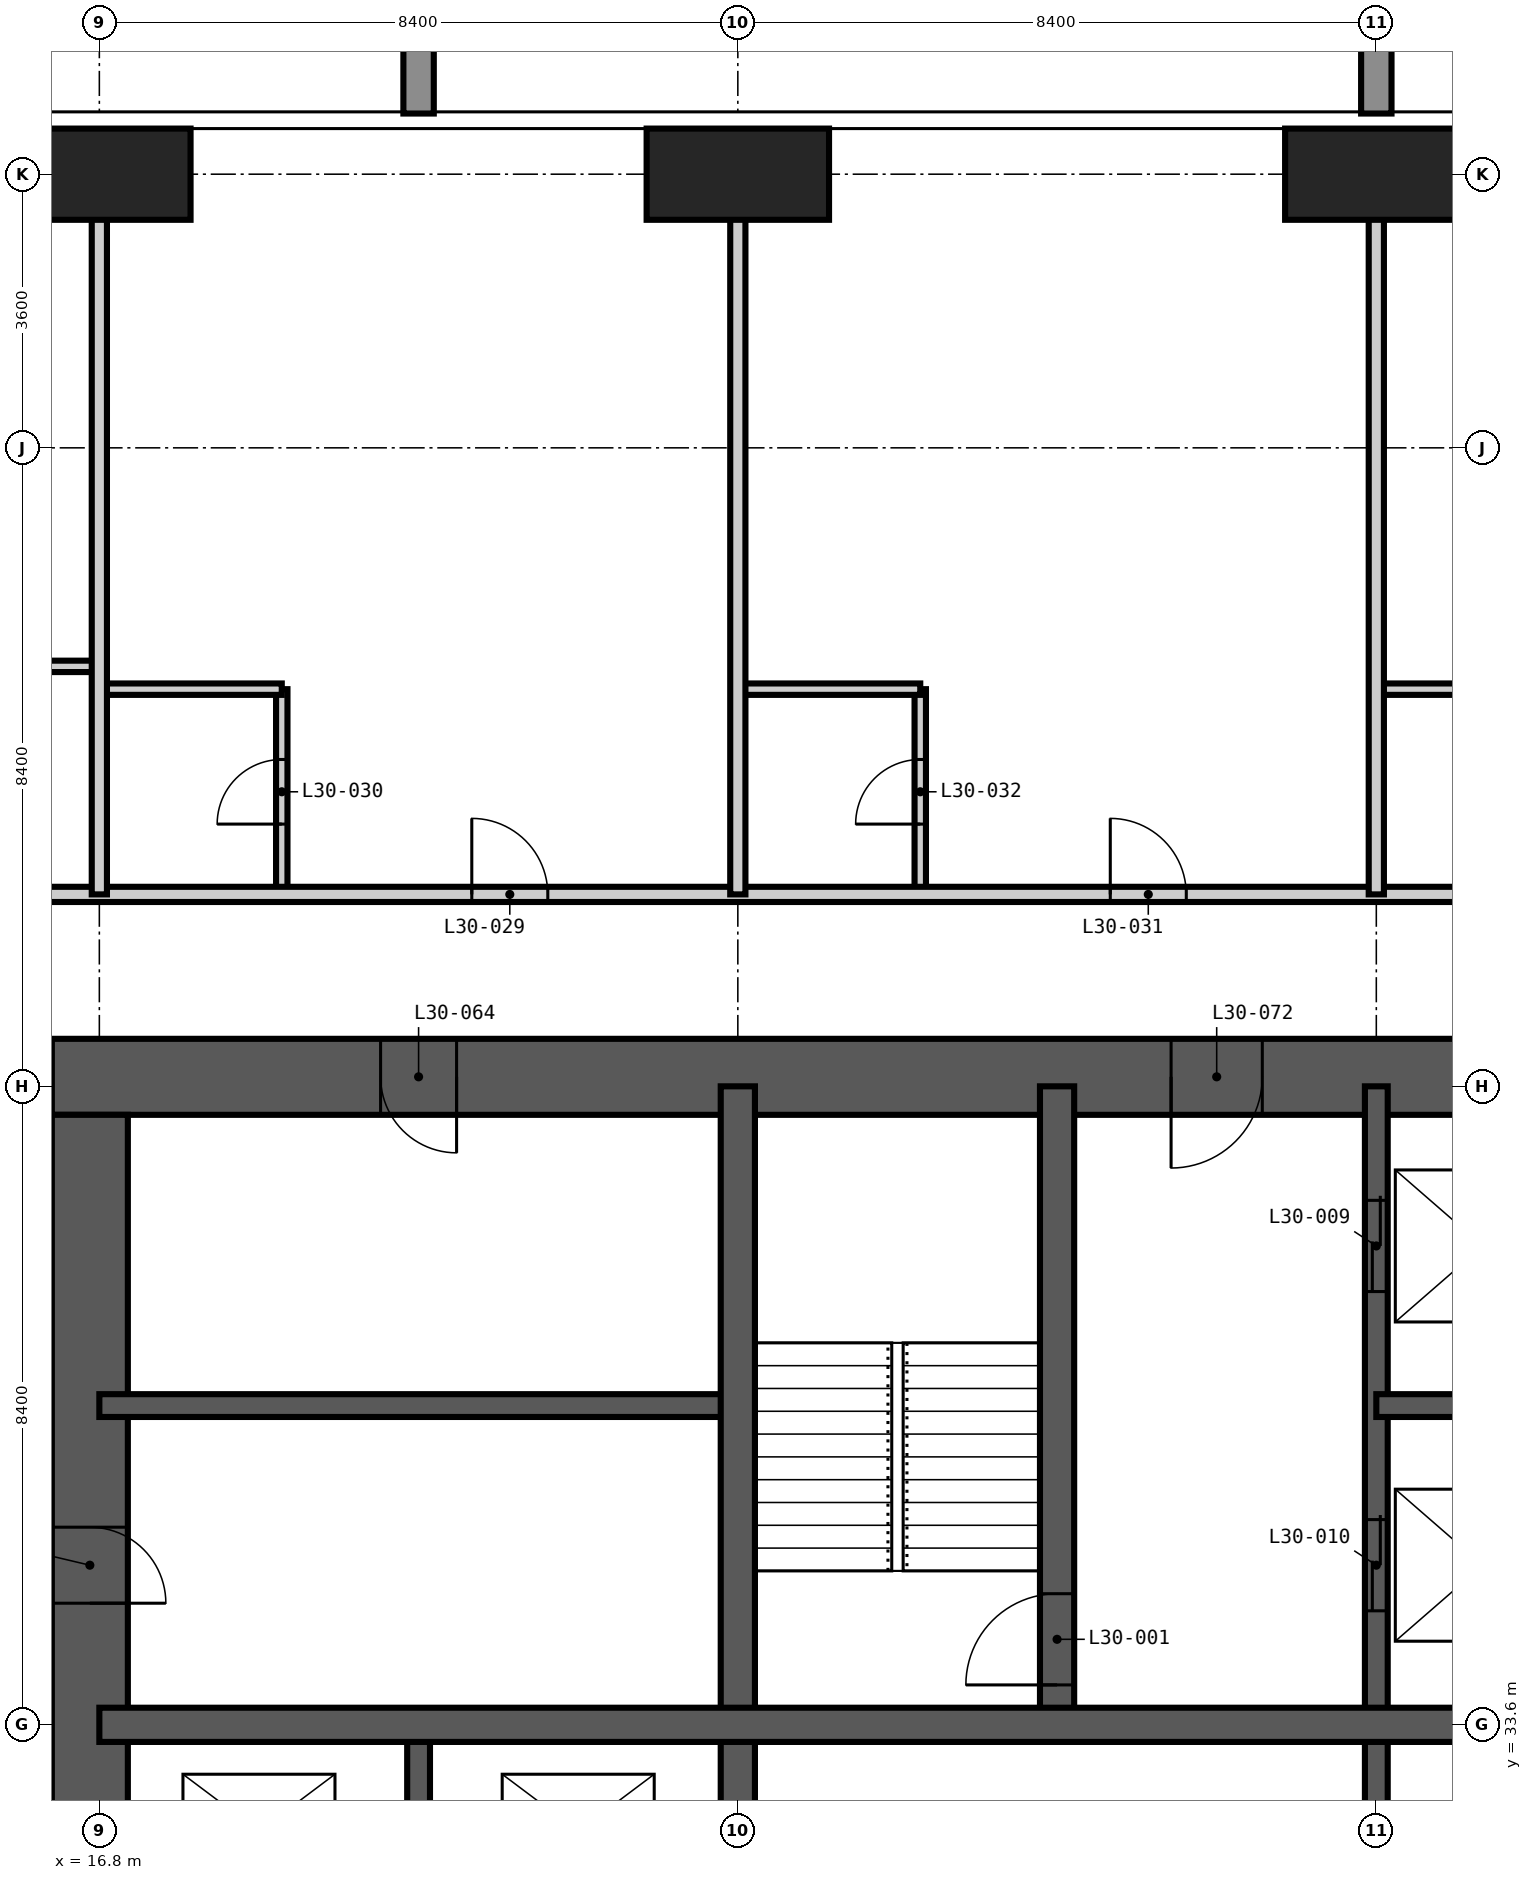
"""IFC4 building model, lengths in metres.
Left out: names, types, materials, properties, quantities, classifications, styles, units other than length and angle.
Written with IfcOpenShell. Run it as: python <this file> out.ifc"""

import sys

from ifc_helpers import new_model, si_unit, direction, frame, frame_2d, origin, origin_2d, place, context, subcontext, project, spatial, rectangle, extrude, element, fill, save


model = new_model("IFC4")
c1 = context("Model", 3, precision=1e-05, world=origin(), true_north=direction((0.0, 1.0)))
c2 = subcontext(c1, "Body", "Model", "MODEL_VIEW")
j1 = project(units=[si_unit("LENGTHUNIT", "METRE"), si_unit("PLANEANGLEUNIT", "RADIAN")], contexts=[c1])
p1 = place(None, origin())
s1 = spatial("IfcSite", under=j1, at=p1, CompositionType="ELEMENT")
p2 = place(p1, origin())
s2 = spatial("IfcBuilding", under=s1, at=p2, CompositionType="ELEMENT")
p3 = place(p2, frame((0.0, 0.0, 118.8)))
s3 = spatial("IfcBuildingStorey", under=s2, at=p3, CompositionType="ELEMENT", Elevation=118.8)
for number, where, z_axis, x_axis in (
    (1, (16.8, 54.0, -0.35), (0.0, 0.0, 1.0), (1.0, 0.0, 0.0)),
    (2, (25.2, 54.0, -0.35), (0.0, 0.0, 1.0), (1.0, 0.0, 0.0)),
    (3, (33.6, 54.0, -0.35), (0.0, 0.0, 1.0), (1.0, 0.0, 0.0)),
):
    element("IfcColumn", number, at=place(p3, frame(where, z_axis=z_axis, x_axis=x_axis)), inside=s3, PredefinedType="COLUMN", context=c2, shape_type="SweptSolid", body=[
        extrude(rectangle(XDim=2.4, YDim=1.2, at=origin_2d()), origin(), (0.0, 0.0, 1.0), 3.6),
    ])
p4 = place(p3, frame((42.625, 42.125, -0.35), z_axis=(0.0, 0.0, 1.0), x_axis=(-1.0, 0.0, 0.0)))
e4 = element("IfcWall", 4, at=p4, inside=s3, PredefinedType="SHEAR", context=c2, shape_type="SweptSolid", body=[
    extrude(rectangle(XDim=26.45, YDim=1.0, at=frame_2d((13.225, 0.0))), origin(), (0.0, 0.0, 1.0), 3.6),
])
p5 = place(p4, frame((21.125, 0.0, 0.35)))
e5 = element("IfcOpeningElement", 5, at=p5, cuts=e4, PredefinedType="OPENING", context=c2, shape_type="SweptSolid", body=[
    extrude(rectangle(XDim=1.0, YDim=2.1, at=frame_2d((0.5, 1.05))), frame((0.0, 0.51, 0.0), z_axis=(0.0, -1.0, 0.0), x_axis=(1.0, 0.0, 0.0)), (0.0, 0.0, 1.0), 1.02),
])
p6 = place(p4, frame((10.525, 0.0, 0.35)))
e6 = element("IfcOpeningElement", 6, at=p6, cuts=e4, PredefinedType="OPENING", context=c2, shape_type="SweptSolid", body=[
    extrude(rectangle(XDim=1.2, YDim=2.2, at=frame_2d((0.6, 1.1))), frame((0.0, 0.51, 0.0), z_axis=(0.0, -1.0, 0.0), x_axis=(1.0, 0.0, 0.0)), (0.0, 0.0, 1.0), 1.02),
])
p7 = place(p3, frame((16.675, 41.625, -0.35), z_axis=(0.0, 0.0, 1.0), x_axis=(0.0, -1.0, 0.0)))
e7 = element("IfcWall", 7, at=p7, inside=s3, PredefinedType="SHEAR", context=c2, shape_type="SweptSolid", body=[
    extrude(rectangle(XDim=24.45, YDim=1.0, at=frame_2d((12.225, 0.0))), origin(), (0.0, 0.0, 1.0), 3.6),
])
p8 = place(p7, frame((11.325, 0.0, 0.35)))
e8 = element("IfcOpeningElement", 8, at=p8, cuts=e7, PredefinedType="OPENING", context=c2, shape_type="SweptSolid", body=[
    extrude(rectangle(XDim=1.8, YDim=2.2, at=frame_2d((0.9, 1.1))), frame((0.0, 0.51, 0.0), z_axis=(0.0, -1.0, 0.0), x_axis=(1.0, 0.0, 0.0)), (0.0, 0.0, 1.0), 1.02),
])
p9 = place(p7, frame((20.125, 0.0, 0.35)))
e9 = element("IfcOpeningElement", 9, at=p9, cuts=e7, PredefinedType="OPENING", context=c2, shape_type="SweptSolid", body=[
    extrude(rectangle(XDim=1.0, YDim=2.1, at=frame_2d((0.5, 1.05))), frame((0.0, 0.51, 0.0), z_axis=(0.0, -1.0, 0.0), x_axis=(1.0, 0.0, 0.0)), (0.0, 0.0, 1.0), 1.02),
])
p10 = place(p7, frame((5.425, 0.0, 0.35)))
e10 = element("IfcOpeningElement", 10, at=p10, cuts=e7, PredefinedType="OPENING", context=c2, shape_type="SweptSolid", body=[
    extrude(rectangle(XDim=1.0, YDim=2.1, at=frame_2d((0.5, 1.05))), frame((0.0, 0.51, 0.0), z_axis=(0.0, -1.0, 0.0), x_axis=(1.0, 0.0, 0.0)), (0.0, 0.0, 1.0), 1.02),
])
p11 = place(p3, frame((21.0, 30.8, -0.35), z_axis=(0.0, 0.0, 1.0), x_axis=(0.0, 1.0, 0.0)))
e11 = element("IfcWall", 11, at=p11, inside=s3, PredefinedType="SHEAR", context=c2, shape_type="SweptSolid", body=[
    extrude(rectangle(XDim=2.8, YDim=0.3, at=frame_2d((1.4, 0.0))), origin(), (0.0, 0.0, 1.0), 3.6),
])
p12 = place(p3, frame((33.6, 16.8, -0.35), z_axis=(0.0, 0.0, 1.0), x_axis=(0.0, 1.0, 0.0)))
e12 = element("IfcWall", 12, at=p12, inside=s3, PredefinedType="SHEAR", context=c2, shape_type="SweptSolid", body=[
    extrude(rectangle(XDim=25.2, YDim=0.3, at=frame_2d((12.6, 0.0))), origin(), (0.0, 0.0, 1.0), 3.6),
])
p13 = place(p12, frame((22.5, 0.0, 0.35)))
e13 = element("IfcOpeningElement", 13, at=p13, cuts=e12, PredefinedType="OPENING", context=c2, shape_type="SweptSolid", body=[
    extrude(rectangle(XDim=1.2, YDim=2.2, at=frame_2d((0.6, 1.1))), frame((0.0, 0.16, 0.0), z_axis=(0.0, -1.0, 0.0), x_axis=(1.0, 0.0, 0.0)), (0.0, 0.0, 1.0), 0.32),
])
p14 = place(p12, frame((18.3, 0.0, 0.35)))
e14 = element("IfcOpeningElement", 14, at=p14, cuts=e12, PredefinedType="OPENING", context=c2, shape_type="SweptSolid", body=[
    extrude(rectangle(XDim=1.2, YDim=2.2, at=frame_2d((0.6, 1.1))), frame((0.0, 0.16, 0.0), z_axis=(0.0, -1.0, 0.0), x_axis=(1.0, 0.0, 0.0)), (0.0, 0.0, 1.0), 0.32),
])
p15 = place(p3, frame((16.8, 37.8, -0.35), z_axis=(0.0, 0.0, 1.0), x_axis=(1.0, 0.0, 0.0)))
e15 = element("IfcWall", 15, at=p15, inside=s3, PredefinedType="SHEAR", context=c2, shape_type="SweptSolid", body=[
    extrude(rectangle(XDim=8.4, YDim=0.3, at=frame_2d((4.2, 0.0))), origin(), (0.0, 0.0, 1.0), 3.6),
])
p16 = place(p3, frame((33.6, 37.8, -0.35), z_axis=(0.0, 0.0, 1.0), x_axis=(1.0, 0.0, 0.0)))
e16 = element("IfcWall", 16, at=p16, inside=s3, PredefinedType="SHEAR", context=c2, shape_type="SweptSolid", body=[
    extrude(rectangle(XDim=2.8, YDim=0.3, at=frame_2d((1.4, 0.0))), origin(), (0.0, 0.0, 1.0), 3.6),
])
p17 = place(p3, frame((25.2, 16.8, -0.35), z_axis=(0.0, 0.0, 1.0), x_axis=(0.0, 1.0, 0.0)))
e17 = element("IfcWall", 17, at=p17, inside=s3, PredefinedType="SHEAR", context=c2, shape_type="SweptSolid", body=[
    extrude(rectangle(XDim=25.2, YDim=0.45, at=frame_2d((12.6, 0.0))), origin(), (0.0, 0.0, 1.0), 3.6),
])
p18 = place(p17, frame((12.1, 0.0, 0.35)))
e18 = element("IfcOpeningElement", 18, at=p18, cuts=e17, PredefinedType="OPENING", context=c2, shape_type="SweptSolid", body=[
    extrude(rectangle(XDim=1.0, YDim=2.1, at=frame_2d((0.5, 1.05))), frame((0.0, 0.235, 0.0), z_axis=(0.0, -1.0, 0.0), x_axis=(1.0, 0.0, 0.0)), (0.0, 0.0, 1.0), 0.47),
])
p19 = place(p3, frame((29.4, 33.6, -0.35), z_axis=(0.0, 0.0, 1.0), x_axis=(0.0, 1.0, 0.0)))
e19 = element("IfcWall", 19, at=p19, inside=s3, PredefinedType="SHEAR", context=c2, shape_type="SweptSolid", body=[
    extrude(rectangle(XDim=8.4, YDim=0.45, at=frame_2d((4.2, 0.0))), origin(), (0.0, 0.0, 1.0), 3.6),
])
p20 = place(p19, frame((0.525, 0.0, 0.35)))
e20 = element("IfcOpeningElement", 20, at=p20, cuts=e19, PredefinedType="OPENING", context=c2, shape_type="SweptSolid", body=[
    extrude(rectangle(XDim=1.2, YDim=2.2, at=frame_2d((0.6, 1.1))), frame((0.0, 0.235, 0.0), z_axis=(0.0, -1.0, 0.0), x_axis=(1.0, 0.0, 0.0)), (0.0, 0.0, 1.0), 0.47),
])
p21 = place(p3, frame((16.8, 33.6, -0.35), z_axis=(0.0, 0.0, 1.0), x_axis=(1.0, 0.0, 0.0)))
e21 = element("IfcWall", 21, at=p21, inside=s3, PredefinedType="SHEAR", context=c2, shape_type="SweptSolid", body=[
    extrude(rectangle(XDim=25.2, YDim=0.45, at=frame_2d((12.6, 0.0))), origin(), (0.0, 0.0, 1.0), 3.6),
])
p22 = place(p21, frame((22.6, 0.0, 0.35)))
e22 = element("IfcOpeningElement", 22, at=p22, cuts=e21, PredefinedType="OPENING", context=c2, shape_type="SweptSolid", body=[
    extrude(rectangle(XDim=1.0, YDim=2.1, at=frame_2d((0.5, 1.05))), frame((0.0, 0.235, 0.0), z_axis=(0.0, -1.0, 0.0), x_axis=(1.0, 0.0, 0.0)), (0.0, 0.0, 1.0), 0.47),
])
p23 = place(p3, frame((19.2, 44.525, 0.0), z_axis=(0.0, 0.0, 1.0), x_axis=(0.0, 1.0, 0.0)))
e23 = element("IfcWall", 23, at=p23, inside=s3, PredefinedType="PARTITIONING", context=c2, shape_type="SweptSolid", body=[
    extrude(rectangle(XDim=2.7, YDim=0.15, at=frame_2d((1.35, 0.0))), origin(), (0.0, 0.0, 1.0), 3.25),
])
p24 = place(p23, frame((0.925, 0.0, 0.0)))
e24 = element("IfcOpeningElement", 24, at=p24, cuts=e23, PredefinedType="OPENING", context=c2, shape_type="SweptSolid", body=[
    extrude(rectangle(XDim=0.85, YDim=2.1, at=frame_2d((0.425, 1.05))), frame((0.0, 0.085, 0.0), z_axis=(0.0, -1.0, 0.0), x_axis=(1.0, 0.0, 0.0)), (0.0, 0.0, 1.0), 0.17),
])
p25 = place(p3, frame((27.6, 44.525, 0.0), z_axis=(0.0, 0.0, 1.0), x_axis=(0.0, 1.0, 0.0)))
e25 = element("IfcWall", 25, at=p25, inside=s3, PredefinedType="PARTITIONING", context=c2, shape_type="SweptSolid", body=[
    extrude(rectangle(XDim=2.7, YDim=0.15, at=frame_2d((1.35, 0.0))), origin(), (0.0, 0.0, 1.0), 3.25),
])
p26 = place(p25, frame((0.925, 0.0, 0.0)))
e26 = element("IfcOpeningElement", 26, at=p26, cuts=e25, PredefinedType="OPENING", context=c2, shape_type="SweptSolid", body=[
    extrude(rectangle(XDim=0.85, YDim=2.1, at=frame_2d((0.425, 1.05))), frame((0.0, 0.085, 0.0), z_axis=(0.0, -1.0, 0.0), x_axis=(1.0, 0.0, 0.0)), (0.0, 0.0, 1.0), 0.17),
])
p27 = place(p3, frame((16.8, 47.225, 0.0), z_axis=(0.0, 0.0, 1.0), x_axis=(1.0, 0.0, 0.0)))
e27 = element("IfcWall", 27, at=p27, inside=s3, PredefinedType="PARTITIONING", context=c2, shape_type="SweptSolid", body=[
    extrude(rectangle(XDim=2.4, YDim=0.15, at=frame_2d((1.2, 0.0))), origin(), (0.0, 0.0, 1.0), 3.25),
])
p28 = place(p3, frame((25.2, 47.225, 0.0), z_axis=(0.0, 0.0, 1.0), x_axis=(1.0, 0.0, 0.0)))
e28 = element("IfcWall", 28, at=p28, inside=s3, PredefinedType="PARTITIONING", context=c2, shape_type="SweptSolid", body=[
    extrude(rectangle(XDim=2.4, YDim=0.15, at=frame_2d((1.2, 0.0))), origin(), (0.0, 0.0, 1.0), 3.25),
])
p29 = place(p3, frame((33.6, 47.225, 0.0), z_axis=(0.0, 0.0, 1.0), x_axis=(1.0, 0.0, 0.0)))
e29 = element("IfcWall", 29, at=p29, inside=s3, PredefinedType="PARTITIONING", context=c2, shape_type="SweptSolid", body=[
    extrude(rectangle(XDim=2.4, YDim=0.15, at=frame_2d((1.2, 0.0))), origin(), (0.0, 0.0, 1.0), 3.25),
])
p30 = place(p3, frame((12.6, 47.525, 0.0), z_axis=(0.0, 0.0, 1.0), x_axis=(1.0, 0.0, 0.0)))
e30 = element("IfcWall", 30, at=p30, inside=s3, PredefinedType="PARTITIONING", context=c2, shape_type="SweptSolid", body=[
    extrude(rectangle(XDim=4.2, YDim=0.15, at=frame_2d((2.1, 0.0))), origin(), (0.0, 0.0, 1.0), 3.25),
])
p31 = place(p30, frame((1.675, 0.0, 0.0)))
e31 = element("IfcOpeningElement", 31, at=p31, cuts=e30, PredefinedType="OPENING", context=c2, shape_type="SweptSolid", body=[
    extrude(rectangle(XDim=0.85, YDim=2.1, at=frame_2d((0.425, 1.05))), frame((0.0, 0.085, 0.0), z_axis=(0.0, -1.0, 0.0), x_axis=(1.0, 0.0, 0.0)), (0.0, 0.0, 1.0), 0.17),
])
p32 = place(p3, frame((12.6, 44.525, 0.0), z_axis=(0.0, 0.0, 1.0), x_axis=(1.0, 0.0, 0.0)))
e32 = element("IfcWall", 32, at=p32, inside=s3, PredefinedType="PARTITIONING", context=c2, shape_type="SweptSolid", body=[
    extrude(rectangle(XDim=32.525, YDim=0.2, at=frame_2d((16.262, 0.0))), origin(), (0.0, 0.0, 1.0), 3.25),
])
p33 = place(p32, frame((9.1, 0.0, 0.0)))
e33 = element("IfcOpeningElement", 33, at=p33, cuts=e32, PredefinedType="OPENING", context=c2, shape_type="SweptSolid", body=[
    extrude(rectangle(XDim=1.0, YDim=2.2, at=frame_2d((0.5, 1.1))), frame((0.0, 0.11, 0.0), z_axis=(0.0, -1.0, 0.0), x_axis=(1.0, 0.0, 0.0)), (0.0, 0.0, 1.0), 0.22),
])
p34 = place(p32, frame((17.5, 0.0, 0.0)))
e34 = element("IfcOpeningElement", 34, at=p34, cuts=e32, PredefinedType="OPENING", context=c2, shape_type="SweptSolid", body=[
    extrude(rectangle(XDim=1.0, YDim=2.2, at=frame_2d((0.5, 1.1))), frame((0.0, 0.11, 0.0), z_axis=(0.0, -1.0, 0.0), x_axis=(1.0, 0.0, 0.0)), (0.0, 0.0, 1.0), 0.22),
])
p35 = place(p32, frame((25.9, 0.0, 0.0)))
e35 = element("IfcOpeningElement", 35, at=p35, cuts=e32, PredefinedType="OPENING", context=c2, shape_type="SweptSolid", body=[
    extrude(rectangle(XDim=1.0, YDim=2.2, at=frame_2d((0.5, 1.1))), frame((0.0, 0.11, 0.0), z_axis=(0.0, -1.0, 0.0), x_axis=(1.0, 0.0, 0.0)), (0.0, 0.0, 1.0), 0.22),
])
for number, where, z_axis, x_axis in (
    (36, (16.8, 44.525, 0.0), (0.0, 0.0, 1.0), (0.0, 1.0, 0.0)),
    (37, (25.2, 44.525, 0.0), (0.0, 0.0, 1.0), (0.0, 1.0, 0.0)),
    (38, (33.6, 44.525, 0.0), (0.0, 0.0, 1.0), (0.0, 1.0, 0.0)),
):
    element("IfcWall", number, at=place(p3, frame(where, z_axis=z_axis, x_axis=x_axis)), inside=s3, PredefinedType="PARTITIONING", context=c2, shape_type="SweptSolid", body=[
        extrude(rectangle(XDim=10.093, YDim=0.2, at=frame_2d((5.046, 0.0))), origin(), (0.0, 0.0, 1.0), 3.25),
    ])
p36 = place(p20, origin())
e39 = element("IfcDoor", 39, at=p36, inside=s3, OperationType="SINGLE_SWING_LEFT", PredefinedType="DOOR", context=c2, shape_type="SweptSolid", body=[
    extrude(rectangle(XDim=1.2, YDim=2.2, at=frame_2d((0.6, 1.1))), frame((0.0, 0.025, 0.0), z_axis=(0.0, -1.0, 0.0), x_axis=(1.0, 0.0, 0.0)), (0.0, 0.0, 1.0), 0.05),
])
fill(e20, e39)
p37 = place(p13, origin())
e40 = element("IfcDoor", 40, at=p37, inside=s3, OperationType="DOUBLE_DOOR_SLIDING", PredefinedType="DOOR", context=c2, shape_type="SweptSolid", body=[
    extrude(rectangle(XDim=1.2, YDim=2.2, at=frame_2d((0.6, 1.1))), frame((0.0, 0.025, 0.0), z_axis=(0.0, -1.0, 0.0), x_axis=(1.0, 0.0, 0.0)), (0.0, 0.0, 1.0), 0.05),
])
fill(e13, e40)
p38 = place(p14, origin())
e41 = element("IfcDoor", 41, at=p38, inside=s3, OperationType="DOUBLE_DOOR_SLIDING", PredefinedType="DOOR", context=c2, shape_type="SweptSolid", body=[
    extrude(rectangle(XDim=1.2, YDim=2.2, at=frame_2d((0.6, 1.1))), frame((0.0, 0.025, 0.0), z_axis=(0.0, -1.0, 0.0), x_axis=(1.0, 0.0, 0.0)), (0.0, 0.0, 1.0), 0.05),
])
fill(e14, e41)
p39 = place(p33, origin())
e42 = element("IfcDoor", 42, at=p39, inside=s3, OperationType="SINGLE_SWING_LEFT", PredefinedType="DOOR", context=c2, shape_type="SweptSolid", body=[
    extrude(rectangle(XDim=1.0, YDim=2.2, at=frame_2d((0.5, 1.1))), frame((0.0, 0.025, 0.0), z_axis=(0.0, -1.0, 0.0), x_axis=(1.0, 0.0, 0.0)), (0.0, 0.0, 1.0), 0.05),
])
fill(e33, e42)
p40 = place(p24, origin())
e43 = element("IfcDoor", 43, at=p40, inside=s3, OperationType="SINGLE_SWING_LEFT", PredefinedType="DOOR", context=c2, shape_type="SweptSolid", body=[
    extrude(rectangle(XDim=0.85, YDim=2.1, at=frame_2d((0.425, 1.05))), frame((0.0, 0.025, 0.0), z_axis=(0.0, -1.0, 0.0), x_axis=(1.0, 0.0, 0.0)), (0.0, 0.0, 1.0), 0.05),
])
fill(e24, e43)
p41 = place(p34, origin())
e44 = element("IfcDoor", 44, at=p41, inside=s3, OperationType="SINGLE_SWING_LEFT", PredefinedType="DOOR", context=c2, shape_type="SweptSolid", body=[
    extrude(rectangle(XDim=1.0, YDim=2.2, at=frame_2d((0.5, 1.1))), frame((0.0, 0.025, 0.0), z_axis=(0.0, -1.0, 0.0), x_axis=(1.0, 0.0, 0.0)), (0.0, 0.0, 1.0), 0.05),
])
fill(e34, e44)
p42 = place(p26, origin())
e45 = element("IfcDoor", 45, at=p42, inside=s3, OperationType="SINGLE_SWING_LEFT", PredefinedType="DOOR", context=c2, shape_type="SweptSolid", body=[
    extrude(rectangle(XDim=0.85, YDim=2.1, at=frame_2d((0.425, 1.05))), frame((0.0, 0.025, 0.0), z_axis=(0.0, -1.0, 0.0), x_axis=(1.0, 0.0, 0.0)), (0.0, 0.0, 1.0), 0.05),
])
fill(e26, e45)
p43 = place(p10, origin())
e46 = element("IfcDoor", 46, at=p43, inside=s3, OperationType="SINGLE_SWING_RIGHT", PredefinedType="DOOR", context=c2, shape_type="SweptSolid", body=[
    extrude(rectangle(XDim=1.0, YDim=2.1, at=frame_2d((0.5, 1.05))), frame((0.0, 0.025, 0.0), z_axis=(0.0, -1.0, 0.0), x_axis=(1.0, 0.0, 0.0)), (0.0, 0.0, 1.0), 0.05),
])
fill(e10, e46)
p44 = place(p5, origin())
e47 = element("IfcDoor", 47, at=p44, inside=s3, OperationType="SINGLE_SWING_LEFT", PredefinedType="DOOR", context=c2, shape_type="SweptSolid", body=[
    extrude(rectangle(XDim=1.0, YDim=2.1, at=frame_2d((0.5, 1.05))), frame((0.0, 0.025, 0.0), z_axis=(0.0, -1.0, 0.0), x_axis=(1.0, 0.0, 0.0)), (0.0, 0.0, 1.0), 0.05),
])
fill(e5, e47)
p45 = place(p6, origin())
e48 = element("IfcDoor", 48, at=p45, inside=s3, OperationType="SINGLE_SWING_RIGHT", PredefinedType="DOOR", context=c2, shape_type="SweptSolid", body=[
    extrude(rectangle(XDim=1.2, YDim=2.2, at=frame_2d((0.6, 1.1))), frame((0.0, 0.025, 0.0), z_axis=(0.0, -1.0, 0.0), x_axis=(1.0, 0.0, 0.0)), (0.0, 0.0, 1.0), 0.05),
])
fill(e6, e48)
save(model, sys.argv[1])
